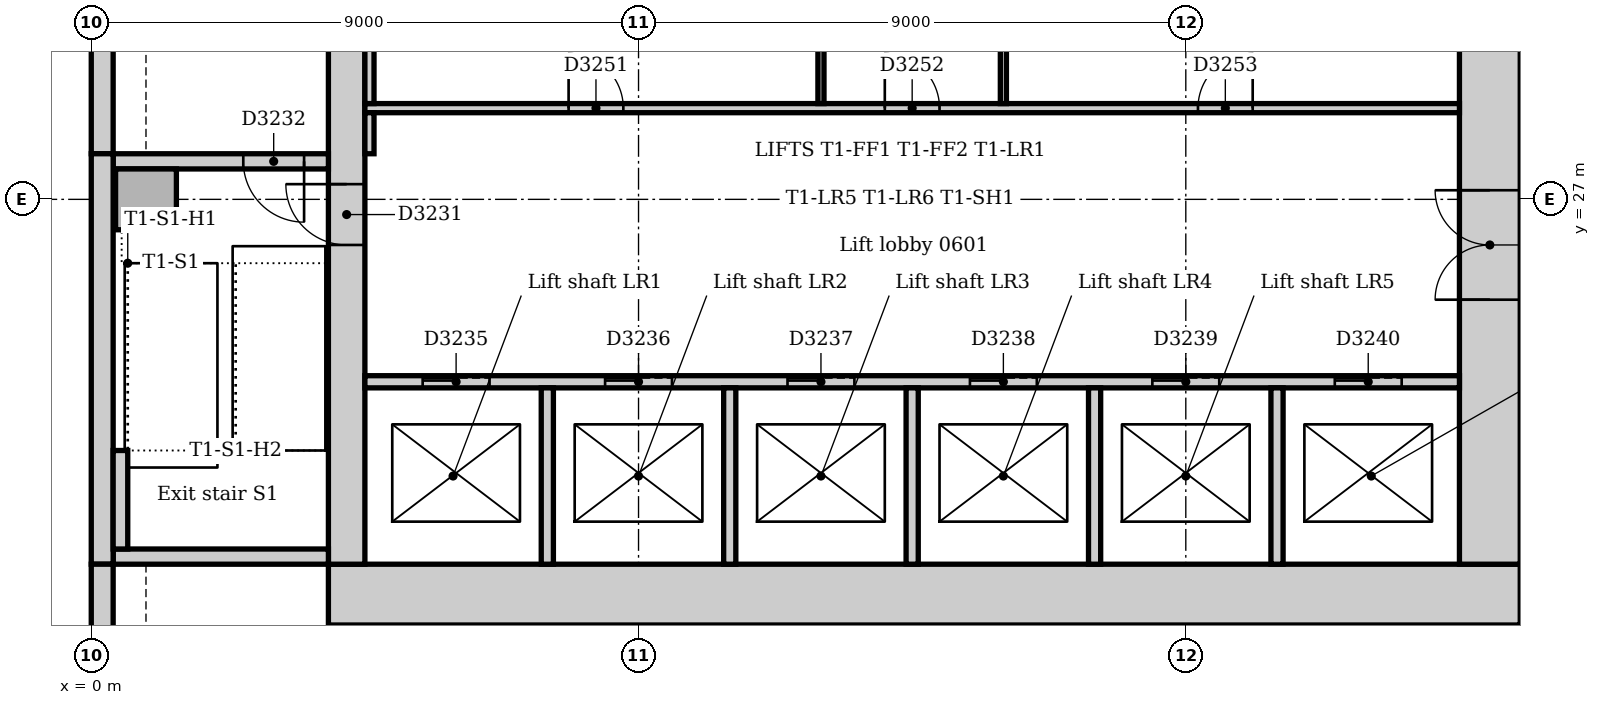
"""IFC4 building model, lengths in metres.
Left out: names, types, materials, properties, quantities, classifications, styles, units other than length and angle.
Written with IfcOpenShell. Run it as: python <this file> out.ifc"""

import sys

from ifc_helpers import new_model, si_unit, direction, frame, frame_2d, origin, origin_2d, place, context, subcontext, project, spatial, rectangle, extrude, element, fill, save


model = new_model("IFC4")
c1 = context("Model", 3, precision=1e-05, world=origin(), true_north=direction((0.0, 1.0)))
c2 = subcontext(c1, "Body", "Model", "MODEL_VIEW")
j1 = project(units=[si_unit("LENGTHUNIT", "METRE"), si_unit("PLANEANGLEUNIT", "RADIAN")], contexts=[c1])
p1 = place(None, origin())
s1 = spatial("IfcSite", under=j1, at=p1, CompositionType="ELEMENT")
p2 = place(p1, origin())
s2 = spatial("IfcBuilding", under=s1, at=p2, CompositionType="ELEMENT")
p3 = place(p2, frame((0.0, 0.0, 30.0)))
s3 = spatial("IfcBuildingStorey", under=s2, at=p3, CompositionType="ELEMENT", Elevation=30.0)
p4 = place(p3, frame((3.9, 20.5, 0.0), z_axis=(0.0, 0.0, 1.0), x_axis=(1.0, 0.0, 0.0)))
e1 = element("IfcWall", 1, at=p4, inside=s3, PredefinedType="SOLIDWALL", context=c2, shape_type="SweptSolid", body=[
    extrude(rectangle(XDim=19.6, YDim=1.0, at=frame_2d((9.8, 0.0))), origin(), (0.0, 0.0, 1.0), 4.0),
])
p5 = place(p3, frame((23.0, 21.0, 0.0), z_axis=(0.0, 0.0, 1.0), x_axis=(0.0, 1.0, 0.0)))
e2 = element("IfcWall", 2, at=p5, inside=s3, PredefinedType="SOLIDWALL", context=c2, shape_type="SweptSolid", body=[
    extrude(rectangle(XDim=10.5, YDim=1.0, at=frame_2d((5.25, 0.0))), origin(), (0.0, 0.0, 1.0), 4.0),
])
p6 = place(p5, frame((4.35, 0.0, 0.0)))
e3 = element("IfcOpeningElement", 3, at=p6, cuts=e2, PredefinedType="OPENING", context=c2, shape_type="SweptSolid", body=[
    extrude(rectangle(XDim=1.8, YDim=2.1, at=frame_2d((0.9, 1.05))), frame((0.0, 0.51, 0.0), z_axis=(0.0, -1.0, 0.0), x_axis=(1.0, 0.0, 0.0)), (0.0, 0.0, 1.0), 1.02),
])
p7 = place(p3, frame((4.2, 31.5, 0.0), z_axis=(0.0, 0.0, 1.0), x_axis=(0.0, -1.0, 0.0)))
e4 = element("IfcWall", 4, at=p7, inside=s3, PredefinedType="SOLIDWALL", context=c2, shape_type="SweptSolid", body=[
    extrude(rectangle(XDim=10.5, YDim=0.6, at=frame_2d((5.25, 0.0))), origin(), (0.0, 0.0, 1.0), 4.0),
])
p8 = place(p7, frame((4.25, 0.0, 0.0)))
e5 = element("IfcOpeningElement", 5, at=p8, cuts=e4, PredefinedType="OPENING", context=c2, shape_type="SweptSolid", body=[
    extrude(rectangle(XDim=1.0, YDim=2.1, at=frame_2d((0.5, 1.05))), frame((0.0, 0.31, 0.0), z_axis=(0.0, -1.0, 0.0), x_axis=(1.0, 0.0, 0.0)), (0.0, 0.0, 1.0), 0.62),
])
p9 = place(p3, frame((0.36, 21.125, 0.0), z_axis=(0.0, 0.0, 1.0), x_axis=(1.0, 0.0, 0.0)))
e6 = element("IfcWall", 6, at=p9, inside=s3, PredefinedType="SOLIDWALL", context=c2, shape_type="SweptSolid", body=[
    extrude(rectangle(XDim=3.54, YDim=0.25, at=frame_2d((1.77, 0.0))), origin(), (0.0, 0.0, 1.0), 4.0),
])
p10 = place(p3, frame((3.9, 27.625, 0.0), z_axis=(0.0, 0.0, 1.0), x_axis=(-1.0, 0.0, 0.0)))
e7 = element("IfcWall", 7, at=p10, inside=s3, PredefinedType="SOLIDWALL", context=c2, shape_type="SweptSolid", body=[
    extrude(rectangle(XDim=3.54, YDim=0.25, at=frame_2d((1.77, 0.0))), origin(), (0.0, 0.0, 1.0), 4.0),
])
p11 = place(p10, frame((0.4, 0.0, 0.0)))
e8 = element("IfcOpeningElement", 8, at=p11, cuts=e7, PredefinedType="OPENING", context=c2, shape_type="SweptSolid", body=[
    extrude(rectangle(XDim=1.0, YDim=2.1, at=frame_2d((0.5, 1.05))), frame((0.0, 0.135, 0.0), z_axis=(0.0, -1.0, 0.0), x_axis=(1.0, 0.0, 0.0)), (0.0, 0.0, 1.0), 0.27),
])
p12 = place(p3, frame((0.9, 27.0, 0.0), z_axis=(0.0, 0.0, 1.0), x_axis=(1.0, 0.0, 0.0)))
e9 = element("IfcColumn", 9, at=p12, inside=s3, PredefinedType="COLUMN", context=c2, shape_type="SweptSolid", body=[
    extrude(rectangle(XDim=1.0, YDim=1.0, at=origin_2d()), origin(), (0.0, 0.0, 1.0), 4.0),
])
p13 = place(p3, frame((0.18, 35.25, 0.0), z_axis=(0.0, 0.0, 1.0), x_axis=(0.0, -1.0, 0.0)))
e10 = element("IfcWall", 10, at=p13, inside=s3, PredefinedType="STANDARD", context=c2, shape_type="SweptSolid", body=[
    extrude(rectangle(XDim=7.5, YDim=0.36, at=frame_2d((3.75, 0.0))), origin(), (0.0, 0.0, 1.0), 3.85),
])
p14 = place(p3, frame((0.18, 27.75, 0.0), z_axis=(0.0, 0.0, 1.0), x_axis=(0.0, -1.0, 0.0)))
e11 = element("IfcWall", 11, at=p14, inside=s3, PredefinedType="STANDARD", context=c2, shape_type="SweptSolid", body=[
    extrude(rectangle(XDim=6.75, YDim=0.36, at=frame_2d((3.375, 0.0))), origin(), (0.0, 0.0, 1.0), 3.85),
])
p15 = place(p3, frame((0.18, 21.0, 0.0), z_axis=(0.0, 0.0, 1.0), x_axis=(0.0, -1.0, 0.0)))
e12 = element("IfcWall", 12, at=p15, inside=s3, PredefinedType="STANDARD", context=c2, shape_type="SweptSolid", body=[
    extrude(rectangle(XDim=16.757, YDim=0.36, at=frame_2d((8.379, 0.0))), origin(), (0.0, 0.0, 1.0), 3.85),
])
p16 = place(p15, frame((1.35, 0.0, 0.9)))
e13 = element("IfcOpeningElement", 13, at=p16, cuts=e12, PredefinedType="OPENING", context=c2, shape_type="SweptSolid", body=[
    extrude(rectangle(XDim=3.3, YDim=1.6, at=frame_2d((1.65, 0.8))), frame((0.0, 0.19, 0.0), z_axis=(0.0, -1.0, 0.0), x_axis=(1.0, 0.0, 0.0)), (0.0, 0.0, 1.0), 0.38),
])
p17 = place(p15, frame((6.15, 0.0, 0.9)))
e14 = element("IfcOpeningElement", 14, at=p17, cuts=e12, PredefinedType="OPENING", context=c2, shape_type="SweptSolid", body=[
    extrude(rectangle(XDim=3.3, YDim=1.6, at=frame_2d((1.65, 0.8))), frame((0.0, 0.19, 0.0), z_axis=(0.0, -1.0, 0.0), x_axis=(1.0, 0.0, 0.0)), (0.0, 0.0, 1.0), 0.38),
])
p18 = place(p15, frame((10.35, 0.0, 0.9)))
e15 = element("IfcOpeningElement", 15, at=p18, cuts=e12, PredefinedType="OPENING", context=c2, shape_type="SweptSolid", body=[
    extrude(rectangle(XDim=3.3, YDim=1.6, at=frame_2d((1.65, 0.8))), frame((0.0, 0.19, 0.0), z_axis=(0.0, -1.0, 0.0), x_axis=(1.0, 0.0, 0.0)), (0.0, 0.0, 1.0), 0.38),
])
p19 = place(p3, frame((0.48, 21.25, 0.0), z_axis=(0.0, 0.0, 1.0), x_axis=(0.0, 1.0, 0.0)))
e16 = element("IfcWall", 16, at=p19, inside=s3, PredefinedType="STANDARD", context=c2, shape_type="SweptSolid", body=[
    extrude(rectangle(XDim=1.62, YDim=0.24, at=frame_2d((0.81, 0.0))), origin(), (0.0, 0.0, 1.0), 4.0),
])
p20 = place(p3, frame((4.5, 24.0, 0.0), z_axis=(0.0, 0.0, 1.0), x_axis=(1.0, 0.0, 0.0)))
e17 = element("IfcWall", 17, at=p20, inside=s3, PredefinedType="PARTITIONING", context=c2, shape_type="SweptSolid", body=[
    extrude(rectangle(XDim=18.0, YDim=0.2, at=frame_2d((9.0, 0.0))), origin(), (0.0, 0.0, 1.0), 3.85),
])
p21 = place(p20, frame((0.95, 0.0, 0.0)))
e18 = element("IfcOpeningElement", 18, at=p21, cuts=e17, PredefinedType="OPENING", context=c2, shape_type="SweptSolid", body=[
    extrude(rectangle(XDim=1.1, YDim=2.1, at=frame_2d((0.55, 1.05))), frame((0.0, 0.11, 0.0), z_axis=(0.0, -1.0, 0.0), x_axis=(1.0, 0.0, 0.0)), (0.0, 0.0, 1.0), 0.22),
])
p22 = place(p20, frame((3.95, 0.0, 0.0)))
e19 = element("IfcOpeningElement", 19, at=p22, cuts=e17, PredefinedType="OPENING", context=c2, shape_type="SweptSolid", body=[
    extrude(rectangle(XDim=1.1, YDim=2.1, at=frame_2d((0.55, 1.05))), frame((0.0, 0.11, 0.0), z_axis=(0.0, -1.0, 0.0), x_axis=(1.0, 0.0, 0.0)), (0.0, 0.0, 1.0), 0.22),
])
p23 = place(p20, frame((6.95, 0.0, 0.0)))
e20 = element("IfcOpeningElement", 20, at=p23, cuts=e17, PredefinedType="OPENING", context=c2, shape_type="SweptSolid", body=[
    extrude(rectangle(XDim=1.1, YDim=2.1, at=frame_2d((0.55, 1.05))), frame((0.0, 0.11, 0.0), z_axis=(0.0, -1.0, 0.0), x_axis=(1.0, 0.0, 0.0)), (0.0, 0.0, 1.0), 0.22),
])
p24 = place(p20, frame((9.95, 0.0, 0.0)))
e21 = element("IfcOpeningElement", 21, at=p24, cuts=e17, PredefinedType="OPENING", context=c2, shape_type="SweptSolid", body=[
    extrude(rectangle(XDim=1.1, YDim=2.1, at=frame_2d((0.55, 1.05))), frame((0.0, 0.11, 0.0), z_axis=(0.0, -1.0, 0.0), x_axis=(1.0, 0.0, 0.0)), (0.0, 0.0, 1.0), 0.22),
])
p25 = place(p20, frame((12.95, 0.0, 0.0)))
e22 = element("IfcOpeningElement", 22, at=p25, cuts=e17, PredefinedType="OPENING", context=c2, shape_type="SweptSolid", body=[
    extrude(rectangle(XDim=1.1, YDim=2.1, at=frame_2d((0.55, 1.05))), frame((0.0, 0.11, 0.0), z_axis=(0.0, -1.0, 0.0), x_axis=(1.0, 0.0, 0.0)), (0.0, 0.0, 1.0), 0.22),
])
p26 = place(p20, frame((15.95, 0.0, 0.0)))
e23 = element("IfcOpeningElement", 23, at=p26, cuts=e17, PredefinedType="OPENING", context=c2, shape_type="SweptSolid", body=[
    extrude(rectangle(XDim=1.1, YDim=2.1, at=frame_2d((0.55, 1.05))), frame((0.0, 0.11, 0.0), z_axis=(0.0, -1.0, 0.0), x_axis=(1.0, 0.0, 0.0)), (0.0, 0.0, 1.0), 0.22),
])
for number, where, z_axis, x_axis in (
    (24, (7.5, 21.0, 0.0), (0.0, 0.0, 1.0), (0.0, 1.0, 0.0)),
    (25, (10.5, 21.0, 0.0), (0.0, 0.0, 1.0), (0.0, 1.0, 0.0)),
    (26, (13.5, 21.0, 0.0), (0.0, 0.0, 1.0), (0.0, 1.0, 0.0)),
    (27, (16.5, 21.0, 0.0), (0.0, 0.0, 1.0), (0.0, 1.0, 0.0)),
    (28, (19.5, 21.0, 0.0), (0.0, 0.0, 1.0), (0.0, 1.0, 0.0)),
):
    element("IfcWall", number, at=place(p3, frame(where, z_axis=z_axis, x_axis=x_axis)), inside=s3, PredefinedType="PARTITIONING", context=c2, shape_type="SweptSolid", body=[
        extrude(rectangle(XDim=2.9, YDim=0.2, at=frame_2d((1.45, 0.0))), origin(), (0.0, 0.0, 1.0), 3.85),
    ])
p27 = place(p3, frame((4.5, 28.5, 0.0), z_axis=(0.0, 0.0, 1.0), x_axis=(1.0, 0.0, 0.0)))
e29 = element("IfcWall", 29, at=p27, inside=s3, PredefinedType="PARTITIONING", context=c2, shape_type="SweptSolid", body=[
    extrude(rectangle(XDim=18.0, YDim=0.15, at=frame_2d((9.0, 0.0))), origin(), (0.0, 0.0, 1.0), 3.85),
])
p28 = place(p27, frame((3.35, 0.0, 0.0)))
e30 = element("IfcOpeningElement", 30, at=p28, cuts=e29, PredefinedType="OPENING", context=c2, shape_type="SweptSolid", body=[
    extrude(rectangle(XDim=0.9, YDim=2.1, at=frame_2d((0.45, 1.05))), frame((0.0, 0.085, 0.0), z_axis=(0.0, -1.0, 0.0), x_axis=(1.0, 0.0, 0.0)), (0.0, 0.0, 1.0), 0.17),
])
p29 = place(p27, frame((8.55, 0.0, 0.0)))
e31 = element("IfcOpeningElement", 31, at=p29, cuts=e29, PredefinedType="OPENING", context=c2, shape_type="SweptSolid", body=[
    extrude(rectangle(XDim=0.9, YDim=2.1, at=frame_2d((0.45, 1.05))), frame((0.0, 0.085, 0.0), z_axis=(0.0, -1.0, 0.0), x_axis=(1.0, 0.0, 0.0)), (0.0, 0.0, 1.0), 0.17),
])
p30 = place(p27, frame((13.7, 0.0, 0.0)))
e32 = element("IfcOpeningElement", 32, at=p30, cuts=e29, PredefinedType="OPENING", context=c2, shape_type="SweptSolid", body=[
    extrude(rectangle(XDim=0.9, YDim=2.1, at=frame_2d((0.45, 1.05))), frame((0.0, 0.085, 0.0), z_axis=(0.0, -1.0, 0.0), x_axis=(1.0, 0.0, 0.0)), (0.0, 0.0, 1.0), 0.17),
])
p31 = place(p3, frame((4.575, 27.75, 0.0), z_axis=(0.0, 0.0, 1.0), x_axis=(0.0, 1.0, 0.0)))
e33 = element("IfcWall", 33, at=p31, inside=s3, PredefinedType="PARTITIONING", context=c2, shape_type="SweptSolid", body=[
    extrude(rectangle(XDim=0.675, YDim=0.15, at=frame_2d((0.338, 0.0))), origin(), (0.0, 0.0, 1.0), 3.85),
])
p32 = place(p3, frame((4.575, 28.575, 0.0), z_axis=(0.0, 0.0, 1.0), x_axis=(0.0, 1.0, 0.0)))
e34 = element("IfcWall", 34, at=p32, inside=s3, PredefinedType="PARTITIONING", context=c2, shape_type="SweptSolid", body=[
    extrude(rectangle(XDim=2.675, YDim=0.15, at=frame_2d((1.337, 0.0))), origin(), (0.0, 0.0, 1.0), 3.85),
])
for number, where, z_axis, x_axis in (
    (35, (12.0, 28.575, 0.0), (0.0, 0.0, 1.0), (0.0, 1.0, 0.0)),
    (36, (15.0, 28.575, 0.0), (0.0, 0.0, 1.0), (0.0, 1.0, 0.0)),
):
    element("IfcWall", number, at=place(p3, frame(where, z_axis=z_axis, x_axis=x_axis)), inside=s3, PredefinedType="PARTITIONING", context=c2, shape_type="SweptSolid", body=[
        extrude(rectangle(XDim=2.675, YDim=0.1, at=frame_2d((1.337, 0.0))), origin(), (0.0, 0.0, 1.0), 3.85),
    ])
p33 = place(p8, frame((1.0, 0.0, 0.0), z_axis=(0.0, 0.0, 1.0), x_axis=(-1.0, 0.0, 0.0)))
e37 = element("IfcDoor", 37, at=p33, inside=s3, OperationType="SINGLE_SWING_RIGHT", PredefinedType="DOOR", context=c2, shape_type="SweptSolid", body=[
    extrude(rectangle(XDim=1.0, YDim=2.1, at=frame_2d((0.5, 1.05))), frame((0.0, 0.025, 0.0), z_axis=(0.0, -1.0, 0.0), x_axis=(1.0, 0.0, 0.0)), (0.0, 0.0, 1.0), 0.05),
])
fill(e5, e37)
p34 = place(p11, origin())
e38 = element("IfcDoor", 38, at=p34, inside=s3, OperationType="SINGLE_SWING_LEFT", PredefinedType="DOOR", context=c2, shape_type="SweptSolid", body=[
    extrude(rectangle(XDim=1.0, YDim=2.1, at=frame_2d((0.5, 1.05))), frame((0.0, 0.025, 0.0), z_axis=(0.0, -1.0, 0.0), x_axis=(1.0, 0.0, 0.0)), (0.0, 0.0, 1.0), 0.05),
])
fill(e8, e38)
p35 = place(p21, origin())
e39 = element("IfcDoor", 39, at=p35, inside=s3, OperationType="SLIDING_TO_LEFT", PredefinedType="DOOR", context=c2, shape_type="SweptSolid", body=[
    extrude(rectangle(XDim=1.1, YDim=2.1, at=frame_2d((0.55, 1.05))), frame((0.0, 0.025, 0.0), z_axis=(0.0, -1.0, 0.0), x_axis=(1.0, 0.0, 0.0)), (0.0, 0.0, 1.0), 0.05),
])
fill(e18, e39)
p36 = place(p22, origin())
e40 = element("IfcDoor", 40, at=p36, inside=s3, OperationType="SLIDING_TO_LEFT", PredefinedType="DOOR", context=c2, shape_type="SweptSolid", body=[
    extrude(rectangle(XDim=1.1, YDim=2.1, at=frame_2d((0.55, 1.05))), frame((0.0, 0.025, 0.0), z_axis=(0.0, -1.0, 0.0), x_axis=(1.0, 0.0, 0.0)), (0.0, 0.0, 1.0), 0.05),
])
fill(e19, e40)
p37 = place(p23, origin())
e41 = element("IfcDoor", 41, at=p37, inside=s3, OperationType="SLIDING_TO_LEFT", PredefinedType="DOOR", context=c2, shape_type="SweptSolid", body=[
    extrude(rectangle(XDim=1.1, YDim=2.1, at=frame_2d((0.55, 1.05))), frame((0.0, 0.025, 0.0), z_axis=(0.0, -1.0, 0.0), x_axis=(1.0, 0.0, 0.0)), (0.0, 0.0, 1.0), 0.05),
])
fill(e20, e41)
p38 = place(p24, origin())
e42 = element("IfcDoor", 42, at=p38, inside=s3, OperationType="SLIDING_TO_LEFT", PredefinedType="DOOR", context=c2, shape_type="SweptSolid", body=[
    extrude(rectangle(XDim=1.1, YDim=2.1, at=frame_2d((0.55, 1.05))), frame((0.0, 0.025, 0.0), z_axis=(0.0, -1.0, 0.0), x_axis=(1.0, 0.0, 0.0)), (0.0, 0.0, 1.0), 0.05),
])
fill(e21, e42)
p39 = place(p25, origin())
e43 = element("IfcDoor", 43, at=p39, inside=s3, OperationType="SLIDING_TO_LEFT", PredefinedType="DOOR", context=c2, shape_type="SweptSolid", body=[
    extrude(rectangle(XDim=1.1, YDim=2.1, at=frame_2d((0.55, 1.05))), frame((0.0, 0.025, 0.0), z_axis=(0.0, -1.0, 0.0), x_axis=(1.0, 0.0, 0.0)), (0.0, 0.0, 1.0), 0.05),
])
fill(e22, e43)
p40 = place(p26, origin())
e44 = element("IfcDoor", 44, at=p40, inside=s3, OperationType="SLIDING_TO_LEFT", PredefinedType="DOOR", context=c2, shape_type="SweptSolid", body=[
    extrude(rectangle(XDim=1.1, YDim=2.1, at=frame_2d((0.55, 1.05))), frame((0.0, 0.025, 0.0), z_axis=(0.0, -1.0, 0.0), x_axis=(1.0, 0.0, 0.0)), (0.0, 0.0, 1.0), 0.05),
])
fill(e23, e44)
p41 = place(p6, origin())
e45 = element("IfcDoor", 45, at=p41, inside=s3, OperationType="DOUBLE_DOOR_DOUBLE_SWING", PredefinedType="DOOR", context=c2, shape_type="SweptSolid", body=[
    extrude(rectangle(XDim=1.8, YDim=2.1, at=frame_2d((0.9, 1.05))), frame((0.0, 0.025, 0.0), z_axis=(0.0, -1.0, 0.0), x_axis=(1.0, 0.0, 0.0)), (0.0, 0.0, 1.0), 0.05),
])
fill(e3, e45)
p42 = place(p28, origin())
e46 = element("IfcDoor", 46, at=p42, inside=s3, OperationType="SINGLE_SWING_LEFT", PredefinedType="DOOR", context=c2, shape_type="SweptSolid", body=[
    extrude(rectangle(XDim=0.9, YDim=2.1, at=frame_2d((0.45, 1.05))), frame((0.0, 0.025, 0.0), z_axis=(0.0, -1.0, 0.0), x_axis=(1.0, 0.0, 0.0)), (0.0, 0.0, 1.0), 0.05),
])
fill(e30, e46)
p43 = place(p29, origin())
e47 = element("IfcDoor", 47, at=p43, inside=s3, OperationType="SINGLE_SWING_LEFT", PredefinedType="DOOR", context=c2, shape_type="SweptSolid", body=[
    extrude(rectangle(XDim=0.9, YDim=2.1, at=frame_2d((0.45, 1.05))), frame((0.0, 0.025, 0.0), z_axis=(0.0, -1.0, 0.0), x_axis=(1.0, 0.0, 0.0)), (0.0, 0.0, 1.0), 0.05),
])
fill(e31, e47)
p44 = place(p30, origin())
e48 = element("IfcDoor", 48, at=p44, inside=s3, OperationType="SINGLE_SWING_RIGHT", PredefinedType="DOOR", context=c2, shape_type="SweptSolid", body=[
    extrude(rectangle(XDim=0.9, YDim=2.1, at=frame_2d((0.45, 1.05))), frame((0.0, 0.025, 0.0), z_axis=(0.0, -1.0, 0.0), x_axis=(1.0, 0.0, 0.0)), (0.0, 0.0, 1.0), 0.05),
])
fill(e32, e48)
save(model, sys.argv[1])
